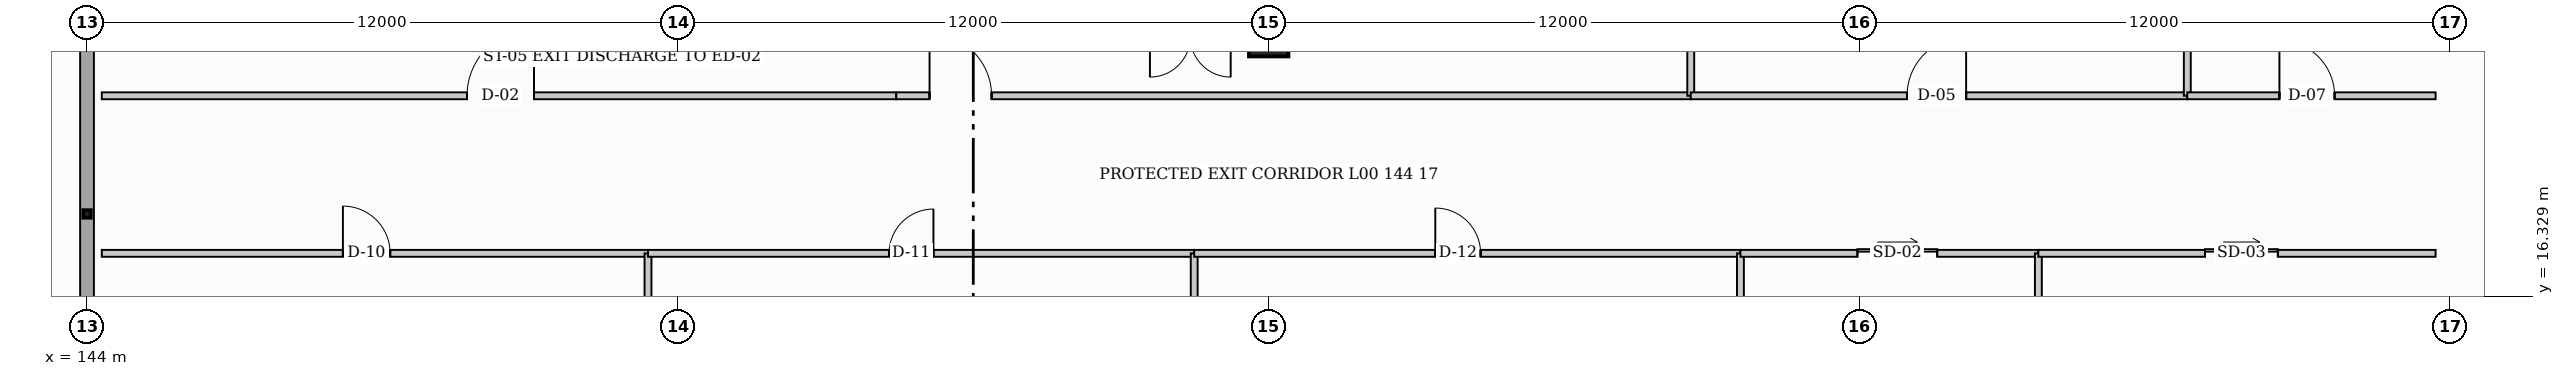
"""IFC4 building model, lengths in metres.
Left out: names, types, materials, properties, quantities, classifications, styles, units other than length and angle.
Written with IfcOpenShell. Run it as: python <this file> out.ifc"""

import sys

from ifc_helpers import new_model, si_unit, direction, frame, frame_2d, origin, origin_2d, place, context, subcontext, project, spatial, rectangle, hollow_rectangle, extrude, element, fill, save


model = new_model("IFC4")
c1 = context("Model", 3, precision=1e-05, world=origin(), true_north=direction((0.0, 1.0)))
c2 = subcontext(c1, "Body", "Model", "MODEL_VIEW")
j1 = project(units=[si_unit("LENGTHUNIT", "METRE"), si_unit("PLANEANGLEUNIT", "RADIAN")], contexts=[c1])
p1 = place(None, origin())
s1 = spatial("IfcSite", under=j1, at=p1, CompositionType="ELEMENT")
p2 = place(p1, origin())
s2 = spatial("IfcBuilding", under=s1, at=p2, CompositionType="ELEMENT")
p3 = place(p2, origin())
s3 = spatial("IfcBuildingStorey", under=s2, at=p3, CompositionType="ELEMENT", Elevation=0.0)
p4 = place(p3, frame((168.0, 21.6, 0.0), z_axis=(0.0, 0.0, 1.0), x_axis=(1.0, 0.0, 0.0)))
e1 = element("IfcColumn", 1, at=p4, inside=s3, PredefinedType="COLUMN", context=c2, shape_type="SweptSolid", body=[
    extrude(rectangle(XDim=0.8, YDim=0.8, at=origin_2d()), origin(), (0.0, 0.0, 1.0), 4.8),
])
p5 = place(p3, frame((144.0, 18.0, 0.0), z_axis=(0.0, 0.0, 1.0), x_axis=(1.0, 0.0, 0.0)))
e2 = element("IfcColumn", 2, at=p5, inside=s3, PredefinedType="COLUMN", context=c2, shape_type="SweptSolid", body=[
    extrude(hollow_rectangle(XDim=0.15, YDim=0.15, WallThickness=0.008, at=origin_2d()), origin(), (0.0, 0.0, 1.0), 4.8),
])
p6 = place(p3, frame((192.0, 45.6, 0.0), z_axis=(0.0, 0.0, 1.0), x_axis=(0.048550316721, -0.998820738044, 0.0)))
e3 = element("IfcWall", 3, at=p6, inside=s3, PredefinedType="STANDARD", context=c2, shape_type="SweptSolid", body=[
    extrude(rectangle(XDim=28.834, YDim=0.28, at=frame_2d((14.417, 0.0))), origin(), (0.0, 0.0, 1.0), 3.897),
])
p7 = place(p6, frame((0.673, 0.0, 0.0)))
e4 = element("IfcOpeningElement", 4, at=p7, cuts=e3, PredefinedType="OPENING", context=c2, shape_type="SweptSolid", body=[
    extrude(rectangle(XDim=2.46, YDim=2.4, at=frame_2d((1.23, 1.2))), frame((0.0, 0.15, 0.0), z_axis=(0.0, -1.0, 0.0), x_axis=(1.0, 0.0, 0.0)), (0.0, 0.0, 1.0), 0.3),
])
p8 = place(p6, frame((4.7, 0.0, 0.95)))
e5 = element("IfcOpeningElement", 5, at=p8, cuts=e3, PredefinedType="OPENING", context=c2, shape_type="SweptSolid", body=[
    extrude(rectangle(XDim=0.9, YDim=1.8, at=frame_2d((0.45, 0.9))), frame((0.0, 0.15, 0.0), z_axis=(0.0, -1.0, 0.0), x_axis=(1.0, 0.0, 0.0)), (0.0, 0.0, 1.0), 0.3),
])
p9 = place(p6, frame((8.3, 0.0, 0.95)))
e6 = element("IfcOpeningElement", 6, at=p9, cuts=e3, PredefinedType="OPENING", context=c2, shape_type="SweptSolid", body=[
    extrude(rectangle(XDim=0.9, YDim=1.8, at=frame_2d((0.45, 0.9))), frame((0.0, 0.15, 0.0), z_axis=(0.0, -1.0, 0.0), x_axis=(1.0, 0.0, 0.0)), (0.0, 0.0, 1.0), 0.3),
])
p10 = place(p6, frame((15.5, 0.0, 0.95)))
e7 = element("IfcOpeningElement", 7, at=p10, cuts=e3, PredefinedType="OPENING", context=c2, shape_type="SweptSolid", body=[
    extrude(rectangle(XDim=0.9, YDim=1.8, at=frame_2d((0.45, 0.9))), frame((0.0, 0.15, 0.0), z_axis=(0.0, -1.0, 0.0), x_axis=(1.0, 0.0, 0.0)), (0.0, 0.0, 1.0), 0.3),
])
p11 = place(p6, frame((19.1, 0.0, 0.95)))
e8 = element("IfcOpeningElement", 8, at=p11, cuts=e3, PredefinedType="OPENING", context=c2, shape_type="SweptSolid", body=[
    extrude(rectangle(XDim=0.9, YDim=1.8, at=frame_2d((0.45, 0.9))), frame((0.0, 0.15, 0.0), z_axis=(0.0, -1.0, 0.0), x_axis=(1.0, 0.0, 0.0)), (0.0, 0.0, 1.0), 0.3),
])
p12 = place(p6, frame((22.7, 0.0, 0.95)))
e9 = element("IfcOpeningElement", 9, at=p12, cuts=e3, PredefinedType="OPENING", context=c2, shape_type="SweptSolid", body=[
    extrude(rectangle(XDim=0.9, YDim=1.8, at=frame_2d((0.45, 0.9))), frame((0.0, 0.15, 0.0), z_axis=(0.0, -1.0, 0.0), x_axis=(1.0, 0.0, 0.0)), (0.0, 0.0, 1.0), 0.3),
])
p13 = place(p6, frame((26.3, 0.0, 0.95)))
e10 = element("IfcOpeningElement", 10, at=p13, cuts=e3, PredefinedType="OPENING", context=c2, shape_type="SweptSolid", body=[
    extrude(rectangle(XDim=0.9, YDim=1.8, at=frame_2d((0.45, 0.9))), frame((0.0, 0.15, 0.0), z_axis=(0.0, -1.0, 0.0), x_axis=(1.0, 0.0, 0.0)), (0.0, 0.0, 1.0), 0.3),
])
p14 = place(p3, frame((193.4, 16.8, 0.0), z_axis=(0.0, 0.0, 1.0), x_axis=(-0.083039487322, -0.996546257604, 0.0)))
e11 = element("IfcWall", 11, at=p14, inside=s3, PredefinedType="STANDARD", context=c2, shape_type="SweptSolid", body=[
    extrude(rectangle(XDim=16.858, YDim=0.28, at=frame_2d((8.429, 0.0))), origin(), (0.0, 0.0, 1.0), 3.976),
])
p15 = place(p14, frame((0.673, 0.0, 0.0)))
e12 = element("IfcOpeningElement", 12, at=p15, cuts=e11, PredefinedType="OPENING", context=c2, shape_type="SweptSolid", body=[
    extrude(rectangle(XDim=2.46, YDim=2.4, at=frame_2d((1.23, 1.2))), frame((0.0, 0.15, 0.0), z_axis=(0.0, -1.0, 0.0), x_axis=(1.0, 0.0, 0.0)), (0.0, 0.0, 1.0), 0.3),
])
p16 = place(p14, frame((4.7, 0.0, 0.95)))
e13 = element("IfcOpeningElement", 13, at=p16, cuts=e11, PredefinedType="OPENING", context=c2, shape_type="SweptSolid", body=[
    extrude(rectangle(XDim=0.9, YDim=1.8, at=frame_2d((0.45, 0.9))), frame((0.0, 0.15, 0.0), z_axis=(0.0, -1.0, 0.0), x_axis=(1.0, 0.0, 0.0)), (0.0, 0.0, 1.0), 0.3),
])
p17 = place(p14, frame((8.3, 0.0, 0.95)))
e14 = element("IfcOpeningElement", 14, at=p17, cuts=e11, PredefinedType="OPENING", context=c2, shape_type="SweptSolid", body=[
    extrude(rectangle(XDim=0.9, YDim=1.8, at=frame_2d((0.45, 0.9))), frame((0.0, 0.15, 0.0), z_axis=(0.0, -1.0, 0.0), x_axis=(1.0, 0.0, 0.0)), (0.0, 0.0, 1.0), 0.3),
])
p18 = place(p14, frame((11.9, 0.0, 0.95)))
e15 = element("IfcOpeningElement", 15, at=p18, cuts=e11, PredefinedType="OPENING", context=c2, shape_type="SweptSolid", body=[
    extrude(rectangle(XDim=0.9, YDim=1.8, at=frame_2d((0.45, 0.9))), frame((0.0, 0.15, 0.0), z_axis=(0.0, -1.0, 0.0), x_axis=(1.0, 0.0, 0.0)), (0.0, 0.0, 1.0), 0.3),
])
p19 = place(p3, frame((144.0, 10.8, 0.0), z_axis=(0.0, 0.0, 1.0), x_axis=(0.0, 1.0, 0.0)))
e16 = element("IfcWall", 16, at=p19, inside=s3, PredefinedType="STANDARD", context=c2, shape_type="SweptSolid", body=[
    extrude(rectangle(XDim=22.8, YDim=0.28, at=frame_2d((11.4, 0.0))), origin(), (0.0, 0.0, 1.0), 3.53),
])
p20 = place(p19, frame((0.675, 0.0, 0.0)))
e17 = element("IfcOpeningElement", 17, at=p20, cuts=e16, PredefinedType="OPENING", context=c2, shape_type="SweptSolid", body=[
    extrude(rectangle(XDim=2.3, YDim=2.3, at=frame_2d((1.15, 1.15))), frame((0.0, 0.15, 0.0), z_axis=(0.0, -1.0, 0.0), x_axis=(1.0, 0.0, 0.0)), (0.0, 0.0, 1.0), 0.3),
])
p21 = place(p3, frame((144.3, 17.2, 0.0), z_axis=(0.0, 0.0, 1.0), x_axis=(1.0, 0.0, 0.0)))
e18 = element("IfcWall", 18, at=p21, inside=s3, PredefinedType="PARTITIONING", context=c2, shape_type="SweptSolid", body=[
    extrude(rectangle(XDim=11.094, YDim=0.14, at=frame_2d((5.547, 0.0))), origin(), (0.0, 0.0, 1.0), 3.818),
])
p22 = place(p21, frame((4.897, 0.0, 0.0)))
e19 = element("IfcOpeningElement", 19, at=p22, cuts=e18, PredefinedType="OPENING", context=c2, shape_type="SweptSolid", body=[
    extrude(rectangle(XDim=0.96, YDim=2.06, at=frame_2d((0.48, 1.03))), frame((0.0, 0.08, 0.0), z_axis=(0.0, -1.0, 0.0), x_axis=(1.0, 0.0, 0.0)), (0.0, 0.0, 1.0), 0.16),
])
p23 = place(p3, frame((155.394, 0.3, 0.0), z_axis=(0.0, 0.0, 1.0), x_axis=(0.0, 1.0, 0.0)))
e20 = element("IfcWall", 20, at=p23, inside=s3, PredefinedType="PARTITIONING", context=c2, shape_type="SweptSolid", body=[
    extrude(rectangle(XDim=16.9, YDim=0.14, at=frame_2d((8.45, 0.0))), origin(), (0.0, 0.0, 1.0), 3.78),
])
p24 = place(p3, frame((155.394, 17.2, 0.0), z_axis=(0.0, 0.0, 1.0), x_axis=(1.0, 0.0, 0.0)))
e21 = element("IfcWall", 21, at=p24, inside=s3, PredefinedType="PARTITIONING", context=c2, shape_type="SweptSolid", body=[
    extrude(rectangle(XDim=11.093, YDim=0.14, at=frame_2d((5.546, 0.0))), origin(), (0.0, 0.0, 1.0), 3.823),
])
p25 = place(p24, frame((4.897, 0.0, 0.0)))
e22 = element("IfcOpeningElement", 22, at=p25, cuts=e21, PredefinedType="OPENING", context=c2, shape_type="SweptSolid", body=[
    extrude(rectangle(XDim=0.9, YDim=2.1, at=frame_2d((0.45, 1.05))), frame((0.0, 0.08, 0.0), z_axis=(0.0, -1.0, 0.0), x_axis=(1.0, 0.0, 0.0)), (0.0, 0.0, 1.0), 0.16),
])
p26 = place(p3, frame((166.487, 0.3, 0.0), z_axis=(0.0, 0.0, 1.0), x_axis=(0.0, 1.0, 0.0)))
e23 = element("IfcWall", 23, at=p26, inside=s3, PredefinedType="PARTITIONING", context=c2, shape_type="SweptSolid", body=[
    extrude(rectangle(XDim=16.9, YDim=0.14, at=frame_2d((8.45, 0.0))), origin(), (0.0, 0.0, 1.0), 3.53),
])
p27 = place(p3, frame((166.487, 17.2, 0.0), z_axis=(0.0, 0.0, 1.0), x_axis=(1.0, 0.0, 0.0)))
e24 = element("IfcWall", 24, at=p27, inside=s3, PredefinedType="PARTITIONING", context=c2, shape_type="SweptSolid", body=[
    extrude(rectangle(XDim=11.094, YDim=0.14, at=frame_2d((5.547, 0.0))), origin(), (0.0, 0.0, 1.0), 3.828),
])
p28 = place(p27, frame((4.897, 0.0, 0.0)))
e25 = element("IfcOpeningElement", 25, at=p28, cuts=e24, PredefinedType="OPENING", context=c2, shape_type="SweptSolid", body=[
    extrude(rectangle(XDim=0.92, YDim=2.04, at=frame_2d((0.46, 1.02))), frame((0.0, 0.08, 0.0), z_axis=(0.0, -1.0, 0.0), x_axis=(1.0, 0.0, 0.0)), (0.0, 0.0, 1.0), 0.16),
])
p29 = place(p3, frame((177.581, 0.3, 0.0), z_axis=(0.0, 0.0, 1.0), x_axis=(0.0, 1.0, 0.0)))
e26 = element("IfcWall", 26, at=p29, inside=s3, PredefinedType="PARTITIONING", context=c2, shape_type="SweptSolid", body=[
    extrude(rectangle(XDim=16.9, YDim=0.14, at=frame_2d((8.45, 0.0))), origin(), (0.0, 0.0, 1.0), 3.738),
])
p30 = place(p3, frame((177.581, 17.2, 0.0), z_axis=(0.0, 0.0, 1.0), x_axis=(1.0, 0.0, 0.0)))
e27 = element("IfcWall", 27, at=p30, inside=s3, PredefinedType="PARTITIONING", context=c2, shape_type="SweptSolid", body=[
    extrude(rectangle(XDim=6.051, YDim=0.14, at=frame_2d((3.025, 0.0))), origin(), (0.0, 0.0, 1.0), 3.897),
])
p31 = place(p30, frame((2.376, 0.0, 0.0)))
e28 = element("IfcOpeningElement", 28, at=p31, cuts=e27, PredefinedType="OPENING", context=c2, shape_type="SweptSolid", body=[
    extrude(rectangle(XDim=1.62, YDim=2.3, at=frame_2d((0.81, 1.15))), frame((0.0, 0.08, 0.0), z_axis=(0.0, -1.0, 0.0), x_axis=(1.0, 0.0, 0.0)), (0.0, 0.0, 1.0), 0.16),
])
p32 = place(p3, frame((183.632, 0.3, 0.0), z_axis=(0.0, 0.0, 1.0), x_axis=(0.0, 1.0, 0.0)))
e29 = element("IfcWall", 29, at=p32, inside=s3, PredefinedType="PARTITIONING", context=c2, shape_type="SweptSolid", body=[
    extrude(rectangle(XDim=16.9, YDim=0.14, at=frame_2d((8.45, 0.0))), origin(), (0.0, 0.0, 1.0), 3.818),
])
p33 = place(p3, frame((183.632, 17.2, 0.0), z_axis=(0.0, 0.0, 1.0), x_axis=(1.0, 0.0, 0.0)))
e30 = element("IfcWall", 30, at=p33, inside=s3, PredefinedType="PARTITIONING", context=c2, shape_type="SweptSolid", body=[
    extrude(rectangle(XDim=8.068, YDim=0.14, at=frame_2d((4.034, 0.0))), origin(), (0.0, 0.0, 1.0), 4.027),
])
p34 = place(p33, frame((3.384, 0.0, 0.0)))
e31 = element("IfcOpeningElement", 31, at=p34, cuts=e30, PredefinedType="OPENING", context=c2, shape_type="SweptSolid", body=[
    extrude(rectangle(XDim=1.48, YDim=2.26, at=frame_2d((0.74, 1.13))), frame((0.0, 0.08, 0.0), z_axis=(0.0, -1.0, 0.0), x_axis=(1.0, 0.0, 0.0)), (0.0, 0.0, 1.0), 0.16),
])
p35 = place(p3, frame((144.3, 20.4, 0.0), z_axis=(0.0, 0.0, 1.0), x_axis=(1.0, 0.0, 0.0)))
e32 = element("IfcWall", 32, at=p35, inside=s3, PredefinedType="PARTITIONING", context=c2, shape_type="SweptSolid", body=[
    extrude(rectangle(XDim=16.136, YDim=0.14, at=frame_2d((8.068, 0.0))), origin(), (0.0, 0.0, 1.0), 3.818),
])
p36 = place(p35, frame((7.418, 0.0, 0.0)))
e33 = element("IfcOpeningElement", 33, at=p36, cuts=e32, PredefinedType="OPENING", context=c2, shape_type="SweptSolid", body=[
    extrude(rectangle(XDim=1.36, YDim=2.18, at=frame_2d((0.68, 1.09))), frame((0.0, 0.08, 0.0), z_axis=(0.0, -1.0, 0.0), x_axis=(1.0, 0.0, 0.0)), (0.0, 0.0, 1.0), 0.16),
])
p37 = place(p3, frame((160.436, 20.4, 0.0), z_axis=(0.0, 0.0, 1.0), x_axis=(1.0, 0.0, 0.0)))
e34 = element("IfcWall", 34, at=p37, inside=s3, PredefinedType="PARTITIONING", context=c2, shape_type="SweptSolid", body=[
    extrude(rectangle(XDim=16.136, YDim=0.14, at=frame_2d((8.068, 0.0))), origin(), (0.0, 0.0, 1.0), 3.828),
])
p38 = place(p37, frame((0.676, 0.0, 0.0)))
e35 = element("IfcOpeningElement", 35, at=p38, cuts=e34, PredefinedType="OPENING", context=c2, shape_type="SweptSolid", body=[
    extrude(rectangle(XDim=1.26, YDim=2.14, at=frame_2d((0.63, 1.07))), frame((0.0, 0.08, 0.0), z_axis=(0.0, -1.0, 0.0), x_axis=(1.0, 0.0, 0.0)), (0.0, 0.0, 1.0), 0.16),
])
p39 = place(p3, frame((176.572, 20.4, 0.0), z_axis=(0.0, 0.0, 1.0), x_axis=(0.0, 1.0, 0.0)))
e36 = element("IfcWall", 36, at=p39, inside=s3, PredefinedType="PARTITIONING", context=c2, shape_type="SweptSolid", body=[
    extrude(rectangle(XDim=24.9, YDim=0.14, at=frame_2d((12.45, 0.0))), origin(), (0.0, 0.0, 1.0), 3.818),
])
p40 = place(p3, frame((176.572, 20.4, 0.0), z_axis=(0.0, 0.0, 1.0), x_axis=(1.0, 0.0, 0.0)))
e37 = element("IfcWall", 37, at=p40, inside=s3, PredefinedType="PARTITIONING", context=c2, shape_type="SweptSolid", body=[
    extrude(rectangle(XDim=10.085, YDim=0.14, at=frame_2d((5.042, 0.0))), origin(), (0.0, 0.0, 1.0), 3.897),
])
p41 = place(p40, frame((4.393, 0.0, 0.0)))
e38 = element("IfcOpeningElement", 38, at=p41, cuts=e37, PredefinedType="OPENING", context=c2, shape_type="SweptSolid", body=[
    extrude(rectangle(XDim=1.2, YDim=2.12, at=frame_2d((0.6, 1.06))), frame((0.0, 0.08, 0.0), z_axis=(0.0, -1.0, 0.0), x_axis=(1.0, 0.0, 0.0)), (0.0, 0.0, 1.0), 0.16),
])
p42 = place(p3, frame((186.657, 20.4, 0.0), z_axis=(0.0, 0.0, 1.0), x_axis=(0.0, 1.0, 0.0)))
e39 = element("IfcWall", 39, at=p42, inside=s3, PredefinedType="PARTITIONING", context=c2, shape_type="SweptSolid", body=[
    extrude(rectangle(XDim=24.9, YDim=0.14, at=frame_2d((12.45, 0.0))), origin(), (0.0, 0.0, 1.0), 3.823),
])
p43 = place(p3, frame((186.657, 20.4, 0.0), z_axis=(0.0, 0.0, 1.0), x_axis=(1.0, 0.0, 0.0)))
e40 = element("IfcWall", 40, at=p43, inside=s3, PredefinedType="PARTITIONING", context=c2, shape_type="SweptSolid", body=[
    extrude(rectangle(XDim=5.043, YDim=0.14, at=frame_2d((2.521, 0.0))), origin(), (0.0, 0.0, 1.0), 4.027),
])
p44 = place(p43, frame((1.871, 0.0, 0.0)))
e41 = element("IfcOpeningElement", 41, at=p44, cuts=e40, PredefinedType="OPENING", context=c2, shape_type="SweptSolid", body=[
    extrude(rectangle(XDim=1.12, YDim=2.08, at=frame_2d((0.56, 1.04))), frame((0.0, 0.08, 0.0), z_axis=(0.0, -1.0, 0.0), x_axis=(1.0, 0.0, 0.0)), (0.0, 0.0, 1.0), 0.16),
])
p45 = place(p22, origin())
e42 = element("IfcDoor", 42, at=p45, inside=s3, OperationType="SINGLE_SWING_LEFT", PredefinedType="DOOR", context=c2, shape_type="SweptSolid", body=[
    extrude(rectangle(XDim=0.96, YDim=2.06, at=frame_2d((0.48, 1.03))), frame((0.0, 0.025, 0.0), z_axis=(0.0, -1.0, 0.0), x_axis=(1.0, 0.0, 0.0)), (0.0, 0.0, 1.0), 0.05),
])
fill(e19, e42)
p46 = place(p25, origin())
e43 = element("IfcDoor", 43, at=p46, inside=s3, OperationType="SINGLE_SWING_RIGHT", PredefinedType="DOOR", context=c2, shape_type="SweptSolid", body=[
    extrude(rectangle(XDim=0.9, YDim=2.1, at=frame_2d((0.45, 1.05))), frame((0.0, 0.025, 0.0), z_axis=(0.0, -1.0, 0.0), x_axis=(1.0, 0.0, 0.0)), (0.0, 0.0, 1.0), 0.05),
])
fill(e22, e43)
p47 = place(p28, origin())
e44 = element("IfcDoor", 44, at=p47, inside=s3, OperationType="SINGLE_SWING_LEFT", PredefinedType="DOOR", context=c2, shape_type="SweptSolid", body=[
    extrude(rectangle(XDim=0.92, YDim=2.04, at=frame_2d((0.46, 1.02))), frame((0.0, 0.025, 0.0), z_axis=(0.0, -1.0, 0.0), x_axis=(1.0, 0.0, 0.0)), (0.0, 0.0, 1.0), 0.05),
])
fill(e25, e44)
p48 = place(p31, origin())
e45 = element("IfcDoor", 45, at=p48, inside=s3, OperationType="SLIDING_TO_RIGHT", PredefinedType="DOOR", context=c2, shape_type="SweptSolid", body=[
    extrude(rectangle(XDim=1.62, YDim=2.3, at=frame_2d((0.81, 1.15))), frame((0.0, 0.025, 0.0), z_axis=(0.0, -1.0, 0.0), x_axis=(1.0, 0.0, 0.0)), (0.0, 0.0, 1.0), 0.05),
])
fill(e28, e45)
p49 = place(p34, origin())
e46 = element("IfcDoor", 46, at=p49, inside=s3, OperationType="SLIDING_TO_LEFT", PredefinedType="DOOR", context=c2, shape_type="SweptSolid", body=[
    extrude(rectangle(XDim=1.48, YDim=2.26, at=frame_2d((0.74, 1.13))), frame((0.0, 0.025, 0.0), z_axis=(0.0, -1.0, 0.0), x_axis=(1.0, 0.0, 0.0)), (0.0, 0.0, 1.0), 0.05),
])
fill(e31, e46)
p50 = place(p36, origin())
e47 = element("IfcDoor", 47, at=p50, inside=s3, OperationType="SINGLE_SWING_RIGHT", PredefinedType="DOOR", context=c2, shape_type="SweptSolid", body=[
    extrude(rectangle(XDim=1.36, YDim=2.18, at=frame_2d((0.68, 1.09))), frame((0.0, 0.025, 0.0), z_axis=(0.0, -1.0, 0.0), x_axis=(1.0, 0.0, 0.0)), (0.0, 0.0, 1.0), 0.05),
])
fill(e33, e47)
p51 = place(p38, origin())
e48 = element("IfcDoor", 48, at=p51, inside=s3, OperationType="SINGLE_SWING_LEFT", PredefinedType="DOOR", context=c2, shape_type="SweptSolid", body=[
    extrude(rectangle(XDim=1.26, YDim=2.14, at=frame_2d((0.63, 1.07))), frame((0.0, 0.025, 0.0), z_axis=(0.0, -1.0, 0.0), x_axis=(1.0, 0.0, 0.0)), (0.0, 0.0, 1.0), 0.05),
])
fill(e35, e48)
p52 = place(p41, origin())
e49 = element("IfcDoor", 49, at=p52, inside=s3, OperationType="SINGLE_SWING_RIGHT", PredefinedType="DOOR", context=c2, shape_type="SweptSolid", body=[
    extrude(rectangle(XDim=1.2, YDim=2.12, at=frame_2d((0.6, 1.06))), frame((0.0, 0.025, 0.0), z_axis=(0.0, -1.0, 0.0), x_axis=(1.0, 0.0, 0.0)), (0.0, 0.0, 1.0), 0.05),
])
fill(e38, e49)
p53 = place(p44, origin())
e50 = element("IfcDoor", 50, at=p53, inside=s3, OperationType="SINGLE_SWING_LEFT", PredefinedType="DOOR", context=c2, shape_type="SweptSolid", body=[
    extrude(rectangle(XDim=1.12, YDim=2.08, at=frame_2d((0.56, 1.04))), frame((0.0, 0.025, 0.0), z_axis=(0.0, -1.0, 0.0), x_axis=(1.0, 0.0, 0.0)), (0.0, 0.0, 1.0), 0.05),
])
fill(e41, e50)
save(model, sys.argv[1])
